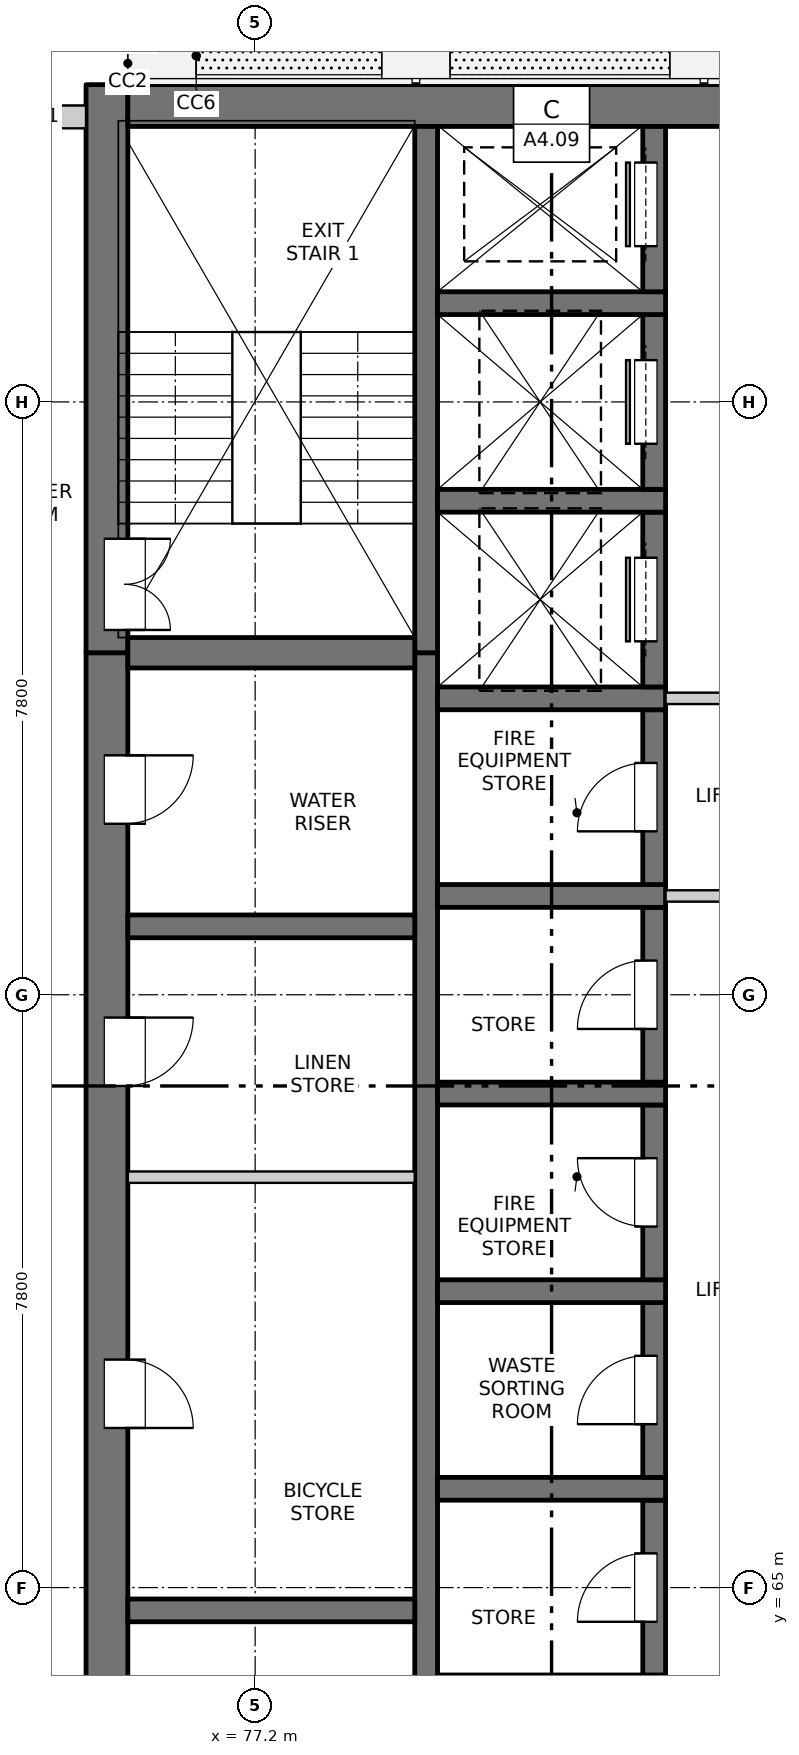
"""IFC4 building model, lengths in metres.
Left out: names, types, materials, properties, quantities, classifications, styles, units other than length and angle.
Written with IfcOpenShell. Run it as: python <this file> out.ifc"""

import sys

from ifc_helpers import new_model, si_unit, direction, frame, frame_2d, origin, place, context, subcontext, project, spatial, rectangle, extrude, element, fill, save


model = new_model("IFC4")
c1 = context("Model", 3, precision=1e-05, world=origin(), true_north=direction((0.0, 1.0)))
c2 = subcontext(c1, "Body", "Model", "MODEL_VIEW")
j1 = project(units=[si_unit("LENGTHUNIT", "METRE"), si_unit("PLANEANGLEUNIT", "RADIAN")], contexts=[c1])
p1 = place(None, origin())
s1 = spatial("IfcSite", under=j1, at=p1, CompositionType="ELEMENT")
p2 = place(p1, origin())
s2 = spatial("IfcBuilding", under=s1, at=p2, CompositionType="ELEMENT")
p3 = place(p2, frame((0.0, 0.0, 158.8)))
s3 = spatial("IfcBuildingStorey", under=s2, at=p3, CompositionType="ELEMENT", Elevation=158.8)
p4 = place(p3, frame((75.25, 54.975, -0.25), z_axis=(0.0, 0.0, 1.0), x_axis=(0.0, 1.0, 0.0)))
e1 = element("IfcWall", 1, at=p4, inside=s3, PredefinedType="SOLIDWALL", context=c2, shape_type="SweptSolid", body=[
    extrude(rectangle(XDim=22.325, YDim=0.55, at=frame_2d((11.163, 0.0))), origin(), (0.0, 0.0, 1.0), 3.4),
])
p5 = place(p4, frame((7.475, 0.0, 0.25)))
e2 = element("IfcOpeningElement", 2, at=p5, cuts=e1, PredefinedType="OPENING", context=c2, shape_type="SweptSolid", body=[
    extrude(rectangle(XDim=0.9, YDim=2.1, at=frame_2d((0.45, 1.05))), frame((0.0, 0.285, 0.0), z_axis=(0.0, -1.0, 0.0), x_axis=(1.0, 0.0, 0.0)), (0.0, 0.0, 1.0), 0.57),
])
p6 = place(p4, frame((12.125, 0.0, 0.25)))
e3 = element("IfcOpeningElement", 3, at=p6, cuts=e1, PredefinedType="OPENING", context=c2, shape_type="SweptSolid", body=[
    extrude(rectangle(XDim=0.9, YDim=2.1, at=frame_2d((0.45, 1.05))), frame((0.0, 0.285, 0.0), z_axis=(0.0, -1.0, 0.0), x_axis=(1.0, 0.0, 0.0)), (0.0, 0.0, 1.0), 0.57),
])
p7 = place(p4, frame((16.625, 0.0, 0.25)))
e4 = element("IfcOpeningElement", 4, at=p7, cuts=e1, PredefinedType="OPENING", context=c2, shape_type="SweptSolid", body=[
    extrude(rectangle(XDim=0.9, YDim=2.1, at=frame_2d((0.45, 1.05))), frame((0.0, 0.285, 0.0), z_axis=(0.0, -1.0, 0.0), x_axis=(1.0, 0.0, 0.0)), (0.0, 0.0, 1.0), 0.57),
])
p8 = place(p4, frame((20.075, 0.0, 0.25)))
e5 = element("IfcOpeningElement", 5, at=p8, cuts=e1, PredefinedType="OPENING", context=c2, shape_type="SweptSolid", body=[
    extrude(rectangle(XDim=0.9, YDim=2.1, at=frame_2d((0.45, 1.05))), frame((0.0, 0.285, 0.0), z_axis=(0.0, -1.0, 0.0), x_axis=(1.0, 0.0, 0.0)), (0.0, 0.0, 1.0), 0.57),
])
p9 = place(p3, frame((75.25, 77.3, -0.25), z_axis=(0.0, 0.0, 1.0), x_axis=(0.0, 1.0, 0.0)))
e6 = element("IfcWall", 6, at=p9, inside=s3, PredefinedType="SOLIDWALL", context=c2, shape_type="SweptSolid", body=[
    extrude(rectangle(XDim=7.475, YDim=0.55, at=frame_2d((3.737, 0.0))), origin(), (0.0, 0.0, 1.0), 3.4),
])
p10 = place(p9, frame((0.3, 0.0, 0.25)))
e7 = element("IfcOpeningElement", 7, at=p10, cuts=e6, PredefinedType="OPENING", context=c2, shape_type="SweptSolid", body=[
    extrude(rectangle(XDim=1.2, YDim=2.1, at=frame_2d((0.6, 1.05))), frame((0.0, 0.285, 0.0), z_axis=(0.0, -1.0, 0.0), x_axis=(1.0, 0.0, 0.0)), (0.0, 0.0, 1.0), 0.57),
])
p11 = place(p3, frame((75.525, 84.5, -0.25), z_axis=(0.0, 0.0, 1.0), x_axis=(1.0, 0.0, 0.0)))
e8 = element("IfcWall", 8, at=p11, inside=s3, PredefinedType="SOLIDWALL", context=c2, shape_type="SweptSolid", body=[
    extrude(rectangle(XDim=18.95, YDim=0.55, at=frame_2d((9.475, 0.0))), origin(), (0.0, 0.0, 1.0), 3.4),
])
p12 = place(p3, frame((79.45, 60.95, -0.25), z_axis=(0.0, 0.0, 1.0), x_axis=(0.0, 1.0, 0.0)))
e9 = element("IfcWall", 9, at=p12, inside=s3, PredefinedType="SOLIDWALL", context=c2, shape_type="SweptSolid", body=[
    extrude(rectangle(XDim=16.35, YDim=0.3, at=frame_2d((8.175, 0.0))), origin(), (0.0, 0.0, 1.0), 3.4),
])
p13 = place(p3, frame((79.45, 77.3, -0.25), z_axis=(0.0, 0.0, 1.0), x_axis=(0.0, 1.0, 0.0)))
e10 = element("IfcWall", 10, at=p13, inside=s3, PredefinedType="SOLIDWALL", context=c2, shape_type="SweptSolid", body=[
    extrude(rectangle(XDim=6.925, YDim=0.3, at=frame_2d((3.462, 0.0))), origin(), (0.0, 0.0, 1.0), 3.4),
])
p14 = place(p3, frame((82.45, 63.85, -0.25), z_axis=(0.0, 0.0, 1.0), x_axis=(0.0, 1.0, 0.0)))
e11 = element("IfcWall", 11, at=p14, inside=s3, PredefinedType="SOLIDWALL", context=c2, shape_type="SweptSolid", body=[
    extrude(rectangle(XDim=2.3, YDim=0.3, at=frame_2d((1.15, 0.0))), origin(), (0.0, 0.0, 1.0), 3.4),
])
p15 = place(p14, frame((0.7, 0.0, 0.25)))
e12 = element("IfcOpeningElement", 12, at=p15, cuts=e11, PredefinedType="OPENING", context=c2, shape_type="SweptSolid", body=[
    extrude(rectangle(XDim=0.9, YDim=2.1, at=frame_2d((0.45, 1.05))), frame((0.0, 0.16, 0.0), z_axis=(0.0, -1.0, 0.0), x_axis=(1.0, 0.0, 0.0)), (0.0, 0.0, 1.0), 0.32),
])
p16 = place(p3, frame((79.6, 66.3, -0.25), z_axis=(0.0, 0.0, 1.0), x_axis=(1.0, 0.0, 0.0)))
e13 = element("IfcWall", 13, at=p16, inside=s3, PredefinedType="SOLIDWALL", context=c2, shape_type="SweptSolid", body=[
    extrude(rectangle(XDim=3.0, YDim=0.3, at=frame_2d((1.5, 0.0))), origin(), (0.0, 0.0, 1.0), 3.4),
])
p17 = place(p3, frame((82.45, 66.45, -0.25), z_axis=(0.0, 0.0, 1.0), x_axis=(0.0, 1.0, 0.0)))
e14 = element("IfcWall", 14, at=p17, inside=s3, PredefinedType="SOLIDWALL", context=c2, shape_type="SweptSolid", body=[
    extrude(rectangle(XDim=2.3, YDim=0.3, at=frame_2d((1.15, 0.0))), origin(), (0.0, 0.0, 1.0), 3.4),
])
p18 = place(p17, frame((0.7, 0.0, 0.25)))
e15 = element("IfcOpeningElement", 15, at=p18, cuts=e14, PredefinedType="OPENING", context=c2, shape_type="SweptSolid", body=[
    extrude(rectangle(XDim=0.9, YDim=2.1, at=frame_2d((0.45, 1.05))), frame((0.0, 0.16, 0.0), z_axis=(0.0, -1.0, 0.0), x_axis=(1.0, 0.0, 0.0)), (0.0, 0.0, 1.0), 0.32),
])
p19 = place(p3, frame((79.6, 68.9, -0.25), z_axis=(0.0, 0.0, 1.0), x_axis=(1.0, 0.0, 0.0)))
e16 = element("IfcWall", 16, at=p19, inside=s3, PredefinedType="SOLIDWALL", context=c2, shape_type="SweptSolid", body=[
    extrude(rectangle(XDim=3.0, YDim=0.3, at=frame_2d((1.5, 0.0))), origin(), (0.0, 0.0, 1.0), 3.4),
])
p20 = place(p3, frame((82.45, 69.05, -0.25), z_axis=(0.0, 0.0, 1.0), x_axis=(0.0, 1.0, 0.0)))
e17 = element("IfcWall", 17, at=p20, inside=s3, PredefinedType="SOLIDWALL", context=c2, shape_type="SweptSolid", body=[
    extrude(rectangle(XDim=2.3, YDim=0.3, at=frame_2d((1.15, 0.0))), origin(), (0.0, 0.0, 1.0), 3.4),
])
p21 = place(p20, frame((0.7, 0.0, 0.25)))
e18 = element("IfcOpeningElement", 18, at=p21, cuts=e17, PredefinedType="OPENING", context=c2, shape_type="SweptSolid", body=[
    extrude(rectangle(XDim=0.9, YDim=2.1, at=frame_2d((0.45, 1.05))), frame((0.0, 0.16, 0.0), z_axis=(0.0, -1.0, 0.0), x_axis=(1.0, 0.0, 0.0)), (0.0, 0.0, 1.0), 0.32),
])
p22 = place(p3, frame((79.6, 71.5, -0.25), z_axis=(0.0, 0.0, 1.0), x_axis=(1.0, 0.0, 0.0)))
e19 = element("IfcWall", 19, at=p22, inside=s3, PredefinedType="SOLIDWALL", context=c2, shape_type="SweptSolid", body=[
    extrude(rectangle(XDim=3.0, YDim=0.3, at=frame_2d((1.5, 0.0))), origin(), (0.0, 0.0, 1.0), 3.4),
])
p23 = place(p3, frame((82.45, 71.65, -0.25), z_axis=(0.0, 0.0, 1.0), x_axis=(0.0, 1.0, 0.0)))
e20 = element("IfcWall", 20, at=p23, inside=s3, PredefinedType="SOLIDWALL", context=c2, shape_type="SweptSolid", body=[
    extrude(rectangle(XDim=2.3, YDim=0.3, at=frame_2d((1.15, 0.0))), origin(), (0.0, 0.0, 1.0), 3.4),
])
p24 = place(p23, frame((0.7, 0.0, 0.25)))
e21 = element("IfcOpeningElement", 21, at=p24, cuts=e20, PredefinedType="OPENING", context=c2, shape_type="SweptSolid", body=[
    extrude(rectangle(XDim=0.9, YDim=2.1, at=frame_2d((0.45, 1.05))), frame((0.0, 0.16, 0.0), z_axis=(0.0, -1.0, 0.0), x_axis=(1.0, 0.0, 0.0)), (0.0, 0.0, 1.0), 0.32),
])
p25 = place(p3, frame((79.6, 74.1, -0.25), z_axis=(0.0, 0.0, 1.0), x_axis=(1.0, 0.0, 0.0)))
e22 = element("IfcWall", 22, at=p25, inside=s3, PredefinedType="SOLIDWALL", context=c2, shape_type="SweptSolid", body=[
    extrude(rectangle(XDim=3.0, YDim=0.3, at=frame_2d((1.5, 0.0))), origin(), (0.0, 0.0, 1.0), 3.4),
])
p26 = place(p3, frame((82.45, 74.25, -0.25), z_axis=(0.0, 0.0, 1.0), x_axis=(0.0, 1.0, 0.0)))
e23 = element("IfcWall", 23, at=p26, inside=s3, PredefinedType="SOLIDWALL", context=c2, shape_type="SweptSolid", body=[
    extrude(rectangle(XDim=2.3, YDim=0.3, at=frame_2d((1.15, 0.0))), origin(), (0.0, 0.0, 1.0), 3.4),
])
p27 = place(p26, frame((0.7, 0.0, 0.25)))
e24 = element("IfcOpeningElement", 24, at=p27, cuts=e23, PredefinedType="OPENING", context=c2, shape_type="SweptSolid", body=[
    extrude(rectangle(XDim=0.9, YDim=2.1, at=frame_2d((0.45, 1.05))), frame((0.0, 0.16, 0.0), z_axis=(0.0, -1.0, 0.0), x_axis=(1.0, 0.0, 0.0)), (0.0, 0.0, 1.0), 0.32),
])
p28 = place(p3, frame((79.6, 76.7, -0.25), z_axis=(0.0, 0.0, 1.0), x_axis=(1.0, 0.0, 0.0)))
e25 = element("IfcWall", 25, at=p28, inside=s3, PredefinedType="SOLIDWALL", context=c2, shape_type="SweptSolid", body=[
    extrude(rectangle(XDim=3.0, YDim=0.3, at=frame_2d((1.5, 0.0))), origin(), (0.0, 0.0, 1.0), 3.4),
])
p29 = place(p3, frame((82.45, 76.85, -0.25), z_axis=(0.0, 0.0, 1.0), x_axis=(0.0, 1.0, 0.0)))
e26 = element("IfcWall", 26, at=p29, inside=s3, PredefinedType="SOLIDWALL", context=c2, shape_type="SweptSolid", body=[
    extrude(rectangle(XDim=2.3, YDim=0.3, at=frame_2d((1.15, 0.0))), origin(), (0.0, 0.0, 1.0), 3.4),
])
p30 = place(p29, frame((0.6, 0.0, 0.25)))
e27 = element("IfcOpeningElement", 27, at=p30, cuts=e26, PredefinedType="OPENING", context=c2, shape_type="SweptSolid", body=[
    extrude(rectangle(XDim=1.1, YDim=2.1, at=frame_2d((0.55, 1.05))), frame((0.0, 0.16, 0.0), z_axis=(0.0, -1.0, 0.0), x_axis=(1.0, 0.0, 0.0)), (0.0, 0.0, 1.0), 0.32),
])
p31 = place(p3, frame((79.6, 79.3, -0.25), z_axis=(0.0, 0.0, 1.0), x_axis=(1.0, 0.0, 0.0)))
e28 = element("IfcWall", 28, at=p31, inside=s3, PredefinedType="SOLIDWALL", context=c2, shape_type="SweptSolid", body=[
    extrude(rectangle(XDim=3.0, YDim=0.3, at=frame_2d((1.5, 0.0))), origin(), (0.0, 0.0, 1.0), 3.4),
])
p32 = place(p3, frame((82.45, 79.45, -0.25), z_axis=(0.0, 0.0, 1.0), x_axis=(0.0, 1.0, 0.0)))
e29 = element("IfcWall", 29, at=p32, inside=s3, PredefinedType="SOLIDWALL", context=c2, shape_type="SweptSolid", body=[
    extrude(rectangle(XDim=2.3, YDim=0.3, at=frame_2d((1.15, 0.0))), origin(), (0.0, 0.0, 1.0), 3.4),
])
p33 = place(p32, frame((0.6, 0.0, 0.25)))
e30 = element("IfcOpeningElement", 30, at=p33, cuts=e29, PredefinedType="OPENING", context=c2, shape_type="SweptSolid", body=[
    extrude(rectangle(XDim=1.1, YDim=2.1, at=frame_2d((0.55, 1.05))), frame((0.0, 0.16, 0.0), z_axis=(0.0, -1.0, 0.0), x_axis=(1.0, 0.0, 0.0)), (0.0, 0.0, 1.0), 0.32),
])
p34 = place(p3, frame((79.6, 81.9, -0.25), z_axis=(0.0, 0.0, 1.0), x_axis=(1.0, 0.0, 0.0)))
e31 = element("IfcWall", 31, at=p34, inside=s3, PredefinedType="SOLIDWALL", context=c2, shape_type="SweptSolid", body=[
    extrude(rectangle(XDim=3.0, YDim=0.3, at=frame_2d((1.5, 0.0))), origin(), (0.0, 0.0, 1.0), 3.4),
])
p35 = place(p3, frame((82.45, 82.05, -0.25), z_axis=(0.0, 0.0, 1.0), x_axis=(0.0, 1.0, 0.0)))
e32 = element("IfcWall", 32, at=p35, inside=s3, PredefinedType="SOLIDWALL", context=c2, shape_type="SweptSolid", body=[
    extrude(rectangle(XDim=2.175, YDim=0.3, at=frame_2d((1.087, 0.0))), origin(), (0.0, 0.0, 1.0), 3.4),
])
p36 = place(p35, frame((0.6, 0.0, 0.25)))
e33 = element("IfcOpeningElement", 33, at=p36, cuts=e32, PredefinedType="OPENING", context=c2, shape_type="SweptSolid", body=[
    extrude(rectangle(XDim=1.1, YDim=2.1, at=frame_2d((0.55, 1.05))), frame((0.0, 0.16, 0.0), z_axis=(0.0, -1.0, 0.0), x_axis=(1.0, 0.0, 0.0)), (0.0, 0.0, 1.0), 0.32),
])
for number, where, z_axis, x_axis in (
    (34, (75.525, 64.7, -0.25), (0.0, 0.0, 1.0), (1.0, 0.0, 0.0)),
    (35, (75.525, 73.7, -0.25), (0.0, 0.0, 1.0), (1.0, 0.0, 0.0)),
):
    element("IfcWall", number, at=place(p3, frame(where, z_axis=z_axis, x_axis=x_axis)), inside=s3, PredefinedType="SOLIDWALL", context=c2, shape_type="SweptSolid", body=[
        extrude(rectangle(XDim=3.775, YDim=0.3, at=frame_2d((1.888, 0.0))), origin(), (0.0, 0.0, 1.0), 3.4),
    ])
p37 = place(p3, frame((75.525, 77.3, -0.25), z_axis=(0.0, 0.0, 1.0), x_axis=(1.0, 0.0, 0.0)))
e36 = element("IfcWall", 36, at=p37, inside=s3, PredefinedType="SOLIDWALL", context=c2, shape_type="SweptSolid", body=[
    extrude(rectangle(XDim=3.775, YDim=0.4, at=frame_2d((1.888, 0.0))), origin(), (0.0, 0.0, 1.0), 3.4),
])
p38 = place(p3, frame((73.675, 84.35, 0.0), z_axis=(0.0, 0.0, 1.0), x_axis=(1.0, 0.0, 0.0)))
e37 = element("IfcWall", 37, at=p38, inside=s3, PredefinedType="SOLIDWALL", context=c2, shape_type="SweptSolid", body=[
    extrude(rectangle(XDim=1.3, YDim=0.3, at=frame_2d((0.65, 0.0))), origin(), (0.0, 0.0, 1.0), 2.7),
])
p39 = place(p3, frame((75.525, 70.4, 0.0), z_axis=(0.0, 0.0, 1.0), x_axis=(1.0, 0.0, 0.0)))
e38 = element("IfcWall", 38, at=p39, inside=s3, PredefinedType="PARTITIONING", context=c2, shape_type="SweptSolid", body=[
    extrude(rectangle(XDim=3.775, YDim=0.15, at=frame_2d((1.887, 0.0))), origin(), (0.0, 0.0, 1.0), 3.15),
])
p40 = place(p3, frame((82.6, 74.1, 0.0), z_axis=(0.0, 0.0, 1.0), x_axis=(1.0, 0.0, 0.0)))
e39 = element("IfcWall", 39, at=p40, inside=s3, PredefinedType="PARTITIONING", context=c2, shape_type="SweptSolid", body=[
    extrude(rectangle(XDim=4.8, YDim=0.15, at=frame_2d((2.4, 0.0))), origin(), (0.0, 0.0, 1.0), 3.15),
])
p41 = place(p40, frame((1.5, 0.0, 0.0)))
e40 = element("IfcOpeningElement", 40, at=p41, cuts=e39, PredefinedType="OPENING", context=c2, shape_type="SweptSolid", body=[
    extrude(rectangle(XDim=1.8, YDim=2.1, at=frame_2d((0.9, 1.05))), frame((0.0, 0.085, 0.0), z_axis=(0.0, -1.0, 0.0), x_axis=(1.0, 0.0, 0.0)), (0.0, 0.0, 1.0), 0.17),
])
p42 = place(p3, frame((82.6, 76.7, 0.0), z_axis=(0.0, 0.0, 1.0), x_axis=(1.0, 0.0, 0.0)))
e41 = element("IfcWall", 41, at=p42, inside=s3, PredefinedType="PARTITIONING", context=c2, shape_type="SweptSolid", body=[
    extrude(rectangle(XDim=4.8, YDim=0.15, at=frame_2d((2.4, 0.0))), origin(), (0.0, 0.0, 1.0), 3.15),
])
p43 = place(p42, frame((1.5, 0.0, 0.0)))
e42 = element("IfcOpeningElement", 42, at=p43, cuts=e41, PredefinedType="OPENING", context=c2, shape_type="SweptSolid", body=[
    extrude(rectangle(XDim=1.8, YDim=2.1, at=frame_2d((0.9, 1.05))), frame((0.0, 0.085, 0.0), z_axis=(0.0, -1.0, 0.0), x_axis=(1.0, 0.0, 0.0)), (0.0, 0.0, 1.0), 0.17),
])
p44 = place(p15, origin())
e43 = element("IfcDoor", 43, at=p44, inside=s3, OperationType="SINGLE_SWING_LEFT", PredefinedType="DOOR", context=c2, shape_type="SweptSolid", body=[
    extrude(rectangle(XDim=0.9, YDim=2.1, at=frame_2d((0.45, 1.05))), frame((0.0, 0.135, 0.0), z_axis=(0.0, -1.0, 0.0), x_axis=(1.0, 0.0, 0.0)), (0.0, 0.0, 1.0), 0.05),
])
fill(e12, e43)
p45 = place(p6, origin())
e44 = element("IfcDoor", 44, at=p45, inside=s3, OperationType="SINGLE_SWING_RIGHT", PredefinedType="DOOR", context=c2, shape_type="SweptSolid", body=[
    extrude(rectangle(XDim=0.9, YDim=2.1, at=frame_2d((0.45, 1.05))), frame((0.0, -0.21, 0.0), z_axis=(0.0, -1.0, 0.0), x_axis=(1.0, 0.0, 0.0)), (0.0, 0.0, 1.0), 0.05),
])
fill(e3, e44)
p46 = place(p18, origin())
e45 = element("IfcDoor", 45, at=p46, inside=s3, OperationType="SINGLE_SWING_LEFT", PredefinedType="DOOR", context=c2, shape_type="SweptSolid", body=[
    extrude(rectangle(XDim=0.9, YDim=2.1, at=frame_2d((0.45, 1.05))), frame((0.0, 0.135, 0.0), z_axis=(0.0, -1.0, 0.0), x_axis=(1.0, 0.0, 0.0)), (0.0, 0.0, 1.0), 0.05),
])
fill(e15, e45)
p47 = place(p21, origin())
e46 = element("IfcDoor", 46, at=p47, inside=s3, OperationType="SINGLE_SWING_RIGHT", PredefinedType="DOOR", context=c2, shape_type="SweptSolid", body=[
    extrude(rectangle(XDim=0.9, YDim=2.1, at=frame_2d((0.45, 1.05))), frame((0.0, 0.135, 0.0), z_axis=(0.0, -1.0, 0.0), x_axis=(1.0, 0.0, 0.0)), (0.0, 0.0, 1.0), 0.05),
])
fill(e18, e46)
p48 = place(p7, origin())
e47 = element("IfcDoor", 47, at=p48, inside=s3, OperationType="SINGLE_SWING_LEFT", PredefinedType="DOOR", context=c2, shape_type="SweptSolid", body=[
    extrude(rectangle(XDim=0.9, YDim=2.1, at=frame_2d((0.45, 1.05))), frame((0.0, -0.21, 0.0), z_axis=(0.0, -1.0, 0.0), x_axis=(1.0, 0.0, 0.0)), (0.0, 0.0, 1.0), 0.05),
])
fill(e4, e47)
p49 = place(p24, origin())
e48 = element("IfcDoor", 48, at=p49, inside=s3, OperationType="SINGLE_SWING_LEFT", PredefinedType="DOOR", context=c2, shape_type="SweptSolid", body=[
    extrude(rectangle(XDim=0.9, YDim=2.1, at=frame_2d((0.45, 1.05))), frame((0.0, 0.135, 0.0), z_axis=(0.0, -1.0, 0.0), x_axis=(1.0, 0.0, 0.0)), (0.0, 0.0, 1.0), 0.05),
])
fill(e21, e48)
p50 = place(p27, origin())
e49 = element("IfcDoor", 49, at=p50, inside=s3, OperationType="SINGLE_SWING_LEFT", PredefinedType="DOOR", context=c2, shape_type="SweptSolid", body=[
    extrude(rectangle(XDim=0.9, YDim=2.1, at=frame_2d((0.45, 1.05))), frame((0.0, 0.135, 0.0), z_axis=(0.0, -1.0, 0.0), x_axis=(1.0, 0.0, 0.0)), (0.0, 0.0, 1.0), 0.05),
])
fill(e24, e49)
p51 = place(p8, origin())
e50 = element("IfcDoor", 50, at=p51, inside=s3, OperationType="SINGLE_SWING_LEFT", PredefinedType="DOOR", context=c2, shape_type="SweptSolid", body=[
    extrude(rectangle(XDim=0.9, YDim=2.1, at=frame_2d((0.45, 1.05))), frame((0.0, -0.21, 0.0), z_axis=(0.0, -1.0, 0.0), x_axis=(1.0, 0.0, 0.0)), (0.0, 0.0, 1.0), 0.05),
])
fill(e5, e50)
p52 = place(p30, origin())
e51 = element("IfcDoor", 51, at=p52, inside=s3, OperationType="SLIDING_TO_LEFT", PredefinedType="DOOR", context=c2, shape_type="SweptSolid", body=[
    extrude(rectangle(XDim=1.1, YDim=2.1, at=frame_2d((0.55, 1.05))), frame((0.0, 0.135, 0.0), z_axis=(0.0, -1.0, 0.0), x_axis=(1.0, 0.0, 0.0)), (0.0, 0.0, 1.0), 0.05),
])
fill(e27, e51)
p53 = place(p10, origin())
e52 = element("IfcDoor", 52, at=p53, inside=s3, OperationType="DOUBLE_DOOR_SINGLE_SWING", PredefinedType="DOOR", context=c2, shape_type="SweptSolid", body=[
    extrude(rectangle(XDim=1.2, YDim=2.1, at=frame_2d((0.6, 1.05))), frame((0.0, -0.21, 0.0), z_axis=(0.0, -1.0, 0.0), x_axis=(1.0, 0.0, 0.0)), (0.0, 0.0, 1.0), 0.05),
])
fill(e7, e52)
p54 = place(p33, origin())
e53 = element("IfcDoor", 53, at=p54, inside=s3, OperationType="SLIDING_TO_LEFT", PredefinedType="DOOR", context=c2, shape_type="SweptSolid", body=[
    extrude(rectangle(XDim=1.1, YDim=2.1, at=frame_2d((0.55, 1.05))), frame((0.0, 0.135, 0.0), z_axis=(0.0, -1.0, 0.0), x_axis=(1.0, 0.0, 0.0)), (0.0, 0.0, 1.0), 0.05),
])
fill(e30, e53)
p55 = place(p36, origin())
e54 = element("IfcDoor", 54, at=p55, inside=s3, OperationType="SLIDING_TO_RIGHT", PredefinedType="DOOR", context=c2, shape_type="SweptSolid", body=[
    extrude(rectangle(XDim=1.1, YDim=2.1, at=frame_2d((0.55, 1.05))), frame((0.0, 0.135, 0.0), z_axis=(0.0, -1.0, 0.0), x_axis=(1.0, 0.0, 0.0)), (0.0, 0.0, 1.0), 0.05),
])
fill(e33, e54)
save(model, sys.argv[1])
